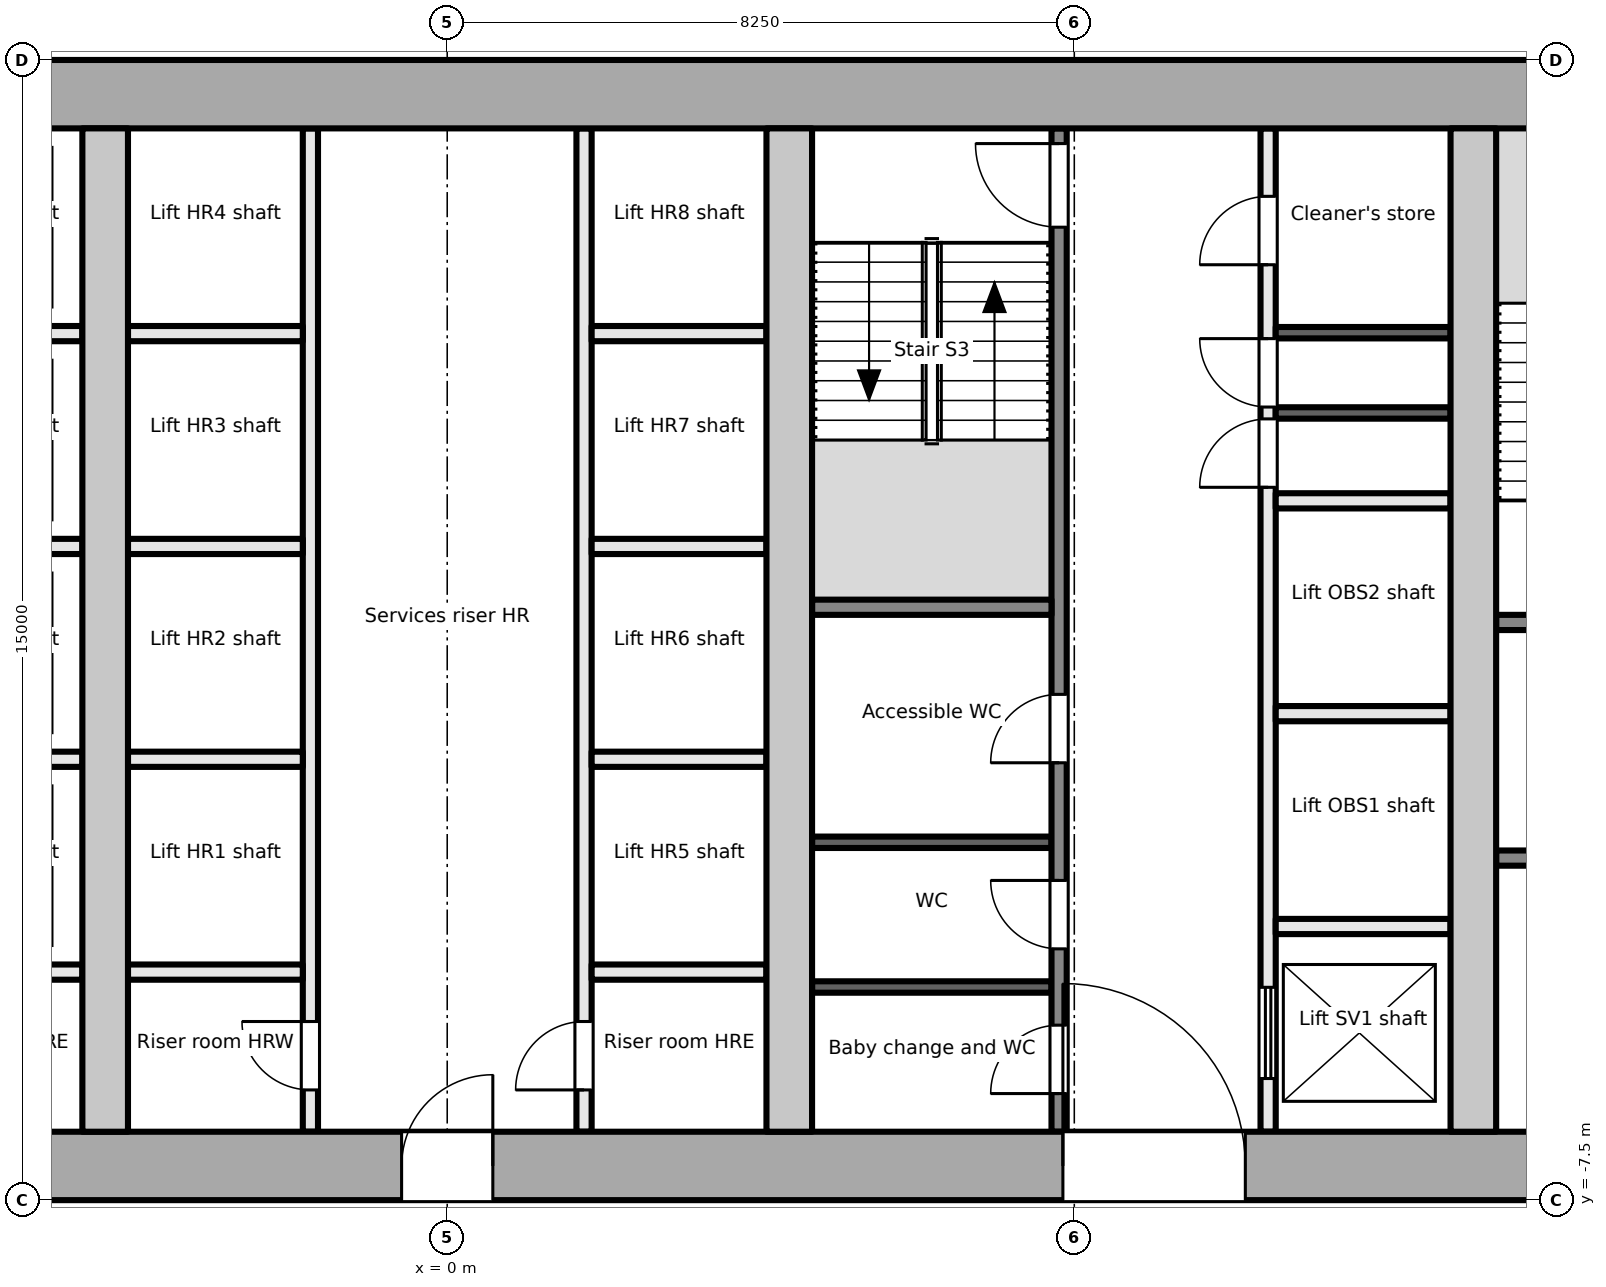
"""IFC4 building model, lengths in metres.
Left out: names, types, materials, properties, quantities, classifications, styles, units other than length and angle.
Written with IfcOpenShell. Run it as: python <this file> out.ifc"""

import sys

from ifc_helpers import new_model, si_unit, direction, frame, frame_2d, origin, place, context, subcontext, project, spatial, rectangle, extrude, element, fill, save


model = new_model("IFC4")
c1 = context("Model", 3, precision=1e-05, world=origin(), true_north=direction((0.0, 1.0)))
c2 = subcontext(c1, "Body", "Model", "MODEL_VIEW")
j1 = project(units=[si_unit("LENGTHUNIT", "METRE"), si_unit("PLANEANGLEUNIT", "RADIAN")], contexts=[c1])
p1 = place(None, origin())
s1 = spatial("IfcSite", under=j1, at=p1, CompositionType="ELEMENT")
p2 = place(p1, origin())
s2 = spatial("IfcBuilding", under=s1, at=p2, CompositionType="ELEMENT")
p3 = place(p2, frame((0.0, 0.0, 83.7)))
s3 = spatial("IfcBuildingStorey", under=s2, at=p3, CompositionType="ELEMENT", Elevation=83.7)
p4 = place(p3, frame((-18.0, -7.05, -0.2), z_axis=(0.0, 0.0, 1.0), x_axis=(1.0, 0.0, 0.0)))
e1 = element("IfcWall", 1, at=p4, inside=s3, PredefinedType="SHEAR", context=c2, shape_type="SweptSolid", body=[
    extrude(rectangle(XDim=36.0, YDim=0.9, at=frame_2d((18.0, 0.0))), origin(), (0.0, 0.0, 1.0), 4.0),
])
p5 = place(p4, frame((7.8, 0.0, 0.2)))
e2 = element("IfcOpeningElement", 2, at=p5, cuts=e1, PredefinedType="OPENING", context=c2, shape_type="SweptSolid", body=[
    extrude(rectangle(XDim=2.4, YDim=2.1, at=frame_2d((1.2, 1.05))), frame((0.0, 0.46, 0.0), z_axis=(0.0, -1.0, 0.0), x_axis=(1.0, 0.0, 0.0)), (0.0, 0.0, 1.0), 0.921),
])
p6 = place(p4, frame((17.4, 0.0, 0.2)))
e3 = element("IfcOpeningElement", 3, at=p6, cuts=e1, PredefinedType="OPENING", context=c2, shape_type="SweptSolid", body=[
    extrude(rectangle(XDim=1.2, YDim=2.1, at=frame_2d((0.6, 1.05))), frame((0.0, 0.46, 0.0), z_axis=(0.0, -1.0, 0.0), x_axis=(1.0, 0.0, 0.0)), (0.0, 0.0, 1.0), 0.921),
])
p7 = place(p4, frame((26.1, 0.0, 0.2)))
e4 = element("IfcOpeningElement", 4, at=p7, cuts=e1, PredefinedType="OPENING", context=c2, shape_type="SweptSolid", body=[
    extrude(rectangle(XDim=2.4, YDim=2.1, at=frame_2d((1.2, 1.05))), frame((0.0, 0.46, 0.0), z_axis=(0.0, -1.0, 0.0), x_axis=(1.0, 0.0, 0.0)), (0.0, 0.0, 1.0), 0.921),
])
p8 = place(p3, frame((-18.0, 7.05, -0.2), z_axis=(0.0, 0.0, 1.0), x_axis=(1.0, 0.0, 0.0)))
e5 = element("IfcWall", 5, at=p8, inside=s3, PredefinedType="SHEAR", context=c2, shape_type="SweptSolid", body=[
    extrude(rectangle(XDim=36.0, YDim=0.9, at=frame_2d((18.0, 0.0))), origin(), (0.0, 0.0, 1.0), 4.0),
])
for number, where, z_axis, x_axis in (
    (6, (-4.5, -6.6, -0.2), (0.0, 0.0, 1.0), (0.0, 1.0, 0.0)),
    (7, (4.5, -6.6, -0.2), (0.0, 0.0, 1.0), (0.0, 1.0, 0.0)),
    (8, (13.5, -6.6, -0.2), (0.0, 0.0, 1.0), (0.0, 1.0, 0.0)),
):
    element("IfcWall", number, at=place(p3, frame(where, z_axis=z_axis, x_axis=x_axis)), inside=s3, PredefinedType="SHEAR", context=c2, shape_type="SweptSolid", body=[
        extrude(rectangle(XDim=13.2, YDim=0.6, at=frame_2d((6.6, 0.0))), origin(), (0.0, 0.0, 1.0), 4.0),
    ])
p9 = place(p3, frame((13.8, -3.0, 0.0), z_axis=(0.0, 0.0, 1.0), x_axis=(1.0, 0.0, 0.0)))
e9 = element("IfcWall", 9, at=p9, inside=s3, PredefinedType="PARTITIONING", context=c2, shape_type="SweptSolid", body=[
    extrude(rectangle(XDim=3.3, YDim=0.2, at=frame_2d((1.65, 0.0))), origin(), (0.0, 0.0, 1.0), 3.8),
])
p10 = place(p9, frame((1.1, 0.0, 0.0)))
e10 = element("IfcOpeningElement", 10, at=p10, cuts=e9, PredefinedType="OPENING", context=c2, shape_type="SweptSolid", body=[
    extrude(rectangle(XDim=1.1, YDim=2.1, at=frame_2d((0.55, 1.05))), frame((0.0, 0.111, 0.0), z_axis=(0.0, -1.0, 0.0), x_axis=(1.0, 0.0, 0.0)), (0.0, 0.0, 1.0), 0.221),
])
p11 = place(p3, frame((13.8, 0.1, 0.0), z_axis=(0.0, 0.0, 1.0), x_axis=(1.0, 0.0, 0.0)))
e11 = element("IfcWall", 11, at=p11, inside=s3, PredefinedType="PARTITIONING", context=c2, shape_type="SweptSolid", body=[
    extrude(rectangle(XDim=3.3, YDim=0.2, at=frame_2d((1.65, 0.0))), origin(), (0.0, 0.0, 1.0), 3.8),
])
p12 = place(p11, frame((1.1, 0.0, 0.0)))
e12 = element("IfcOpeningElement", 12, at=p12, cuts=e11, PredefinedType="OPENING", context=c2, shape_type="SweptSolid", body=[
    extrude(rectangle(XDim=1.1, YDim=2.1, at=frame_2d((0.55, 1.05))), frame((0.0, 0.111, 0.0), z_axis=(0.0, -1.0, 0.0), x_axis=(1.0, 0.0, 0.0)), (0.0, 0.0, 1.0), 0.221),
])
for number, where, z_axis, x_axis in (
    (13, (-7.1, -1.7, 0.0), (0.0, 0.0, 1.0), (1.0, 0.0, 0.0)),
    (14, (-7.1, 1.1, 0.0), (0.0, 0.0, 1.0), (1.0, 0.0, 0.0)),
    (15, (-7.1, 3.9, 0.0), (0.0, 0.0, 1.0), (1.0, 0.0, 0.0)),
    (16, (-7.1, -4.5, 0.0), (0.0, 0.0, 1.0), (1.0, 0.0, 0.0)),
):
    element("IfcWall", number, at=place(p3, frame(where, z_axis=z_axis, x_axis=x_axis)), inside=s3, PredefinedType="PARTITIONING", context=c2, shape_type="SweptSolid", body=[
        extrude(rectangle(XDim=2.3, YDim=0.2, at=frame_2d((1.15, 0.0))), origin(), (0.0, 0.0, 1.0), 3.8),
    ])
p13 = place(p3, frame((-1.8, -6.6, 0.0), z_axis=(0.0, 0.0, 1.0), x_axis=(0.0, 1.0, 0.0)))
e17 = element("IfcWall", 17, at=p13, inside=s3, PredefinedType="PARTITIONING", context=c2, shape_type="SweptSolid", body=[
    extrude(rectangle(XDim=13.2, YDim=0.2, at=frame_2d((6.6, 0.0))), origin(), (0.0, 0.0, 1.0), 3.8),
])
p14 = place(p13, frame((0.55, 0.0, 0.0)))
e18 = element("IfcOpeningElement", 18, at=p14, cuts=e17, PredefinedType="OPENING", context=c2, shape_type="SweptSolid", body=[
    extrude(rectangle(XDim=0.9, YDim=2.1, at=frame_2d((0.45, 1.05))), frame((0.0, 0.111, 0.0), z_axis=(0.0, -1.0, 0.0), x_axis=(1.0, 0.0, 0.0)), (0.0, 0.0, 1.0), 0.221),
])
p15 = place(p3, frame((1.8, -6.6, 0.0), z_axis=(0.0, 0.0, 1.0), x_axis=(0.0, 1.0, 0.0)))
e19 = element("IfcWall", 19, at=p15, inside=s3, PredefinedType="PARTITIONING", context=c2, shape_type="SweptSolid", body=[
    extrude(rectangle(XDim=13.2, YDim=0.2, at=frame_2d((6.6, 0.0))), origin(), (0.0, 0.0, 1.0), 3.8),
])
p16 = place(p15, frame((0.55, 0.0, 0.0)))
e20 = element("IfcOpeningElement", 20, at=p16, cuts=e19, PredefinedType="OPENING", context=c2, shape_type="SweptSolid", body=[
    extrude(rectangle(XDim=0.9, YDim=2.1, at=frame_2d((0.45, 1.05))), frame((0.0, 0.111, 0.0), z_axis=(0.0, -1.0, 0.0), x_axis=(1.0, 0.0, 0.0)), (0.0, 0.0, 1.0), 0.221),
])
for number, where, z_axis, x_axis in (
    (21, (-4.2, -1.7, 0.0), (0.0, 0.0, 1.0), (1.0, 0.0, 0.0)),
    (22, (-4.2, 1.1, 0.0), (0.0, 0.0, 1.0), (1.0, 0.0, 0.0)),
    (23, (-4.2, 3.9, 0.0), (0.0, 0.0, 1.0), (1.0, 0.0, 0.0)),
    (24, (-4.2, -4.5, 0.0), (0.0, 0.0, 1.0), (1.0, 0.0, 0.0)),
    (25, (1.9, -1.7, 0.0), (0.0, 0.0, 1.0), (1.0, 0.0, 0.0)),
    (26, (1.9, 1.1, 0.0), (0.0, 0.0, 1.0), (1.0, 0.0, 0.0)),
    (27, (1.9, 3.9, 0.0), (0.0, 0.0, 1.0), (1.0, 0.0, 0.0)),
    (28, (1.9, -4.5, 0.0), (0.0, 0.0, 1.0), (1.0, 0.0, 0.0)),
):
    element("IfcWall", number, at=place(p3, frame(where, z_axis=z_axis, x_axis=x_axis)), inside=s3, PredefinedType="PARTITIONING", context=c2, shape_type="SweptSolid", body=[
        extrude(rectangle(XDim=2.3, YDim=0.2, at=frame_2d((1.15, 0.0))), origin(), (0.0, 0.0, 1.0), 3.8),
    ])
p17 = place(p3, frame((8.05, -6.6, 0.0), z_axis=(0.0, 0.0, 1.0), x_axis=(0.0, 1.0, 0.0)))
e29 = element("IfcWall", 29, at=p17, inside=s3, PredefinedType="PARTITIONING", context=c2, shape_type="SweptSolid", body=[
    extrude(rectangle(XDim=13.2, YDim=0.2, at=frame_2d((6.6, 0.0))), origin(), (0.0, 0.0, 1.0), 3.8),
])
p18 = place(p17, frame((0.502, 0.0, 0.0)))
e30 = element("IfcOpeningElement", 30, at=p18, cuts=e29, PredefinedType="OPENING", context=c2, shape_type="SweptSolid", body=[
    extrude(rectangle(XDim=0.9, YDim=2.1, at=frame_2d((0.45, 1.05))), frame((0.0, 0.111, 0.0), z_axis=(0.0, -1.0, 0.0), x_axis=(1.0, 0.0, 0.0)), (0.0, 0.0, 1.0), 0.221),
])
p19 = place(p17, frame((2.406, 0.0, 0.0)))
e31 = element("IfcOpeningElement", 31, at=p19, cuts=e29, PredefinedType="OPENING", context=c2, shape_type="SweptSolid", body=[
    extrude(rectangle(XDim=0.9, YDim=2.1, at=frame_2d((0.45, 1.05))), frame((0.0, 0.111, 0.0), z_axis=(0.0, -1.0, 0.0), x_axis=(1.0, 0.0, 0.0)), (0.0, 0.0, 1.0), 0.221),
])
p20 = place(p17, frame((4.854, 0.0, 0.0)))
e32 = element("IfcOpeningElement", 32, at=p20, cuts=e29, PredefinedType="OPENING", context=c2, shape_type="SweptSolid", body=[
    extrude(rectangle(XDim=0.9, YDim=2.1, at=frame_2d((0.45, 1.05))), frame((0.0, 0.111, 0.0), z_axis=(0.0, -1.0, 0.0), x_axis=(1.0, 0.0, 0.0)), (0.0, 0.0, 1.0), 0.221),
])
p21 = place(p17, frame((11.9, 0.0, 0.0)))
e33 = element("IfcOpeningElement", 33, at=p21, cuts=e29, PredefinedType="OPENING", context=c2, shape_type="SweptSolid", body=[
    extrude(rectangle(XDim=1.1, YDim=2.1, at=frame_2d((0.55, 1.05))), frame((0.0, 0.111, 0.0), z_axis=(0.0, -1.0, 0.0), x_axis=(1.0, 0.0, 0.0)), (0.0, 0.0, 1.0), 0.221),
])
p22 = place(p3, frame((10.8, -6.6, 0.0), z_axis=(0.0, 0.0, 1.0), x_axis=(0.0, 1.0, 0.0)))
e34 = element("IfcWall", 34, at=p22, inside=s3, PredefinedType="PARTITIONING", context=c2, shape_type="SweptSolid", body=[
    extrude(rectangle(XDim=13.2, YDim=0.2, at=frame_2d((6.6, 0.0))), origin(), (0.0, 0.0, 1.0), 3.8),
])
p23 = place(p22, frame((0.7, 0.0, 0.0)))
e35 = element("IfcOpeningElement", 35, at=p23, cuts=e34, PredefinedType="OPENING", context=c2, shape_type="SweptSolid", body=[
    extrude(rectangle(XDim=1.2, YDim=2.1, at=frame_2d((0.6, 1.05))), frame((0.0, 0.111, 0.0), z_axis=(0.0, -1.0, 0.0), x_axis=(1.0, 0.0, 0.0)), (0.0, 0.0, 1.0), 0.221),
])
p24 = place(p22, frame((8.478, 0.0, 0.0)))
e36 = element("IfcOpeningElement", 36, at=p24, cuts=e34, PredefinedType="OPENING", context=c2, shape_type="SweptSolid", body=[
    extrude(rectangle(XDim=0.9, YDim=2.1, at=frame_2d((0.45, 1.05))), frame((0.0, 0.111, 0.0), z_axis=(0.0, -1.0, 0.0), x_axis=(1.0, 0.0, 0.0)), (0.0, 0.0, 1.0), 0.221),
])
p25 = place(p22, frame((9.534, 0.0, 0.0)))
e37 = element("IfcOpeningElement", 37, at=p25, cuts=e34, PredefinedType="OPENING", context=c2, shape_type="SweptSolid", body=[
    extrude(rectangle(XDim=0.9, YDim=2.1, at=frame_2d((0.45, 1.05))), frame((0.0, 0.111, 0.0), z_axis=(0.0, -1.0, 0.0), x_axis=(1.0, 0.0, 0.0)), (0.0, 0.0, 1.0), 0.221),
])
p26 = place(p22, frame((11.406, 0.0, 0.0)))
e38 = element("IfcOpeningElement", 38, at=p26, cuts=e34, PredefinedType="OPENING", context=c2, shape_type="SweptSolid", body=[
    extrude(rectangle(XDim=0.9, YDim=2.1, at=frame_2d((0.45, 1.05))), frame((0.0, 0.111, 0.0), z_axis=(0.0, -1.0, 0.0), x_axis=(1.0, 0.0, 0.0)), (0.0, 0.0, 1.0), 0.221),
])
p27 = place(p3, frame((4.8, 0.3, 0.0), z_axis=(0.0, 0.0, 1.0), x_axis=(1.0, 0.0, 0.0)))
e39 = element("IfcWall", 39, at=p27, inside=s3, PredefinedType="PARTITIONING", context=c2, shape_type="SweptSolid", body=[
    extrude(rectangle(XDim=3.15, YDim=0.2, at=frame_2d((1.575, 0.0))), origin(), (0.0, 0.0, 1.0), 3.8),
])
for number, where, z_axis, x_axis in (
    (40, (4.8, -4.696, 0.0), (0.0, 0.0, 1.0), (1.0, 0.0, 0.0)),
    (41, (4.8, -2.792, 0.0), (0.0, 0.0, 1.0), (1.0, 0.0, 0.0)),
):
    element("IfcWall", number, at=place(p3, frame(where, z_axis=z_axis, x_axis=x_axis)), inside=s3, PredefinedType="PARTITIONING", context=c2, shape_type="SweptSolid", body=[
        extrude(rectangle(XDim=3.15, YDim=0.15, at=frame_2d((1.575, 0.0))), origin(), (0.0, 0.0, 1.0), 3.8),
    ])
for number, where, z_axis, x_axis in (
    (42, (10.9, -3.9, 0.0), (0.0, 0.0, 1.0), (1.0, 0.0, 0.0)),
    (43, (10.9, -1.1, 0.0), (0.0, 0.0, 1.0), (1.0, 0.0, 0.0)),
    (44, (10.9, 1.7, 0.0), (0.0, 0.0, 1.0), (1.0, 0.0, 0.0)),
):
    element("IfcWall", number, at=place(p3, frame(where, z_axis=z_axis, x_axis=x_axis)), inside=s3, PredefinedType="PARTITIONING", context=c2, shape_type="SweptSolid", body=[
        extrude(rectangle(XDim=2.3, YDim=0.2, at=frame_2d((1.15, 0.0))), origin(), (0.0, 0.0, 1.0), 3.8),
    ])
for number, where, z_axis, x_axis in (
    (45, (10.9, 2.856, 0.0), (0.0, 0.0, 1.0), (1.0, 0.0, 0.0)),
    (46, (10.9, 3.912, 0.0), (0.0, 0.0, 1.0), (1.0, 0.0, 0.0)),
):
    element("IfcWall", number, at=place(p3, frame(where, z_axis=z_axis, x_axis=x_axis)), inside=s3, PredefinedType="PARTITIONING", context=c2, shape_type="SweptSolid", body=[
        extrude(rectangle(XDim=2.3, YDim=0.15, at=frame_2d((1.15, 0.0))), origin(), (0.0, 0.0, 1.0), 3.8),
    ])
p28 = place(p14, origin())
e47 = element("IfcDoor", 47, at=p28, inside=s3, OperationType="SINGLE_SWING_RIGHT", PredefinedType="DOOR", context=c2, shape_type="SweptSolid", body=[
    extrude(rectangle(XDim=0.9, YDim=2.1, at=frame_2d((0.45, 1.05))), frame((0.0, 0.025, 0.0), z_axis=(0.0, -1.0, 0.0), x_axis=(1.0, 0.0, 0.0)), (0.0, 0.0, 1.0), 0.05),
])
fill(e18, e47)
p29 = place(p16, origin())
e48 = element("IfcDoor", 48, at=p29, inside=s3, OperationType="SINGLE_SWING_LEFT", PredefinedType="DOOR", context=c2, shape_type="SweptSolid", body=[
    extrude(rectangle(XDim=0.9, YDim=2.1, at=frame_2d((0.45, 1.05))), frame((0.0, 0.025, 0.0), z_axis=(0.0, -1.0, 0.0), x_axis=(1.0, 0.0, 0.0)), (0.0, 0.0, 1.0), 0.05),
])
fill(e20, e48)
p30 = place(p6, origin())
e49 = element("IfcDoor", 49, at=p30, inside=s3, OperationType="SINGLE_SWING_RIGHT", PredefinedType="DOOR", context=c2, shape_type="SweptSolid", body=[
    extrude(rectangle(XDim=1.2, YDim=2.1, at=frame_2d((0.6, 1.05))), frame((0.0, 0.025, 0.0), z_axis=(0.0, -1.0, 0.0), x_axis=(1.0, 0.0, 0.0)), (0.0, 0.0, 1.0), 0.05),
])
fill(e3, e49)
p31 = place(p18, origin())
e50 = element("IfcDoor", 50, at=p31, inside=s3, OperationType="SINGLE_SWING_LEFT", PredefinedType="DOOR", context=c2, shape_type="SweptSolid", body=[
    extrude(rectangle(XDim=0.9, YDim=2.1, at=frame_2d((0.45, 1.05))), frame((0.0, 0.025, 0.0), z_axis=(0.0, -1.0, 0.0), x_axis=(1.0, 0.0, 0.0)), (0.0, 0.0, 1.0), 0.05),
])
fill(e30, e50)
p32 = place(p19, origin())
e51 = element("IfcDoor", 51, at=p32, inside=s3, OperationType="SINGLE_SWING_RIGHT", PredefinedType="DOOR", context=c2, shape_type="SweptSolid", body=[
    extrude(rectangle(XDim=0.9, YDim=2.1, at=frame_2d((0.45, 1.05))), frame((0.0, 0.025, 0.0), z_axis=(0.0, -1.0, 0.0), x_axis=(1.0, 0.0, 0.0)), (0.0, 0.0, 1.0), 0.05),
])
fill(e31, e51)
p33 = place(p20, origin())
e52 = element("IfcDoor", 52, at=p33, inside=s3, OperationType="SINGLE_SWING_LEFT", PredefinedType="DOOR", context=c2, shape_type="SweptSolid", body=[
    extrude(rectangle(XDim=0.9, YDim=2.1, at=frame_2d((0.45, 1.05))), frame((0.0, 0.025, 0.0), z_axis=(0.0, -1.0, 0.0), x_axis=(1.0, 0.0, 0.0)), (0.0, 0.0, 1.0), 0.05),
])
fill(e32, e52)
p34 = place(p21, origin())
e53 = element("IfcDoor", 53, at=p34, inside=s3, OperationType="SINGLE_SWING_RIGHT", PredefinedType="DOOR", context=c2, shape_type="SweptSolid", body=[
    extrude(rectangle(XDim=1.1, YDim=2.1, at=frame_2d((0.55, 1.05))), frame((0.0, 0.025, 0.0), z_axis=(0.0, -1.0, 0.0), x_axis=(1.0, 0.0, 0.0)), (0.0, 0.0, 1.0), 0.05),
])
fill(e33, e53)
p35 = place(p7, origin())
e54 = element("IfcDoor", 54, at=p35, inside=s3, OperationType="DOUBLE_DOOR_DOUBLE_SWING", PredefinedType="DOOR", context=c2, shape_type="SweptSolid", body=[
    extrude(rectangle(XDim=2.4, YDim=2.1, at=frame_2d((1.2, 1.05))), frame((0.0, 0.025, 0.0), z_axis=(0.0, -1.0, 0.0), x_axis=(1.0, 0.0, 0.0)), (0.0, 0.0, 1.0), 0.05),
])
fill(e4, e54)
p36 = place(p23, origin())
e55 = element("IfcDoor", 55, at=p36, inside=s3, OperationType="DOUBLE_DOOR_SLIDING", PredefinedType="DOOR", context=c2, shape_type="SweptSolid", body=[
    extrude(rectangle(XDim=1.2, YDim=2.1, at=frame_2d((0.6, 1.05))), frame((0.0, 0.025, 0.0), z_axis=(0.0, -1.0, 0.0), x_axis=(1.0, 0.0, 0.0)), (0.0, 0.0, 1.0), 0.05),
])
fill(e35, e55)
p37 = place(p24, origin())
e56 = element("IfcDoor", 56, at=p37, inside=s3, OperationType="SINGLE_SWING_LEFT", PredefinedType="DOOR", context=c2, shape_type="SweptSolid", body=[
    extrude(rectangle(XDim=0.9, YDim=2.1, at=frame_2d((0.45, 1.05))), frame((0.0, 0.025, 0.0), z_axis=(0.0, -1.0, 0.0), x_axis=(1.0, 0.0, 0.0)), (0.0, 0.0, 1.0), 0.05),
])
fill(e36, e56)
p38 = place(p25, origin())
e57 = element("IfcDoor", 57, at=p38, inside=s3, OperationType="SINGLE_SWING_RIGHT", PredefinedType="DOOR", context=c2, shape_type="SweptSolid", body=[
    extrude(rectangle(XDim=0.9, YDim=2.1, at=frame_2d((0.45, 1.05))), frame((0.0, 0.025, 0.0), z_axis=(0.0, -1.0, 0.0), x_axis=(1.0, 0.0, 0.0)), (0.0, 0.0, 1.0), 0.05),
])
fill(e37, e57)
p39 = place(p26, origin())
e58 = element("IfcDoor", 58, at=p39, inside=s3, OperationType="SINGLE_SWING_LEFT", PredefinedType="DOOR", context=c2, shape_type="SweptSolid", body=[
    extrude(rectangle(XDim=0.9, YDim=2.1, at=frame_2d((0.45, 1.05))), frame((0.0, 0.025, 0.0), z_axis=(0.0, -1.0, 0.0), x_axis=(1.0, 0.0, 0.0)), (0.0, 0.0, 1.0), 0.05),
])
fill(e38, e58)
save(model, sys.argv[1])
